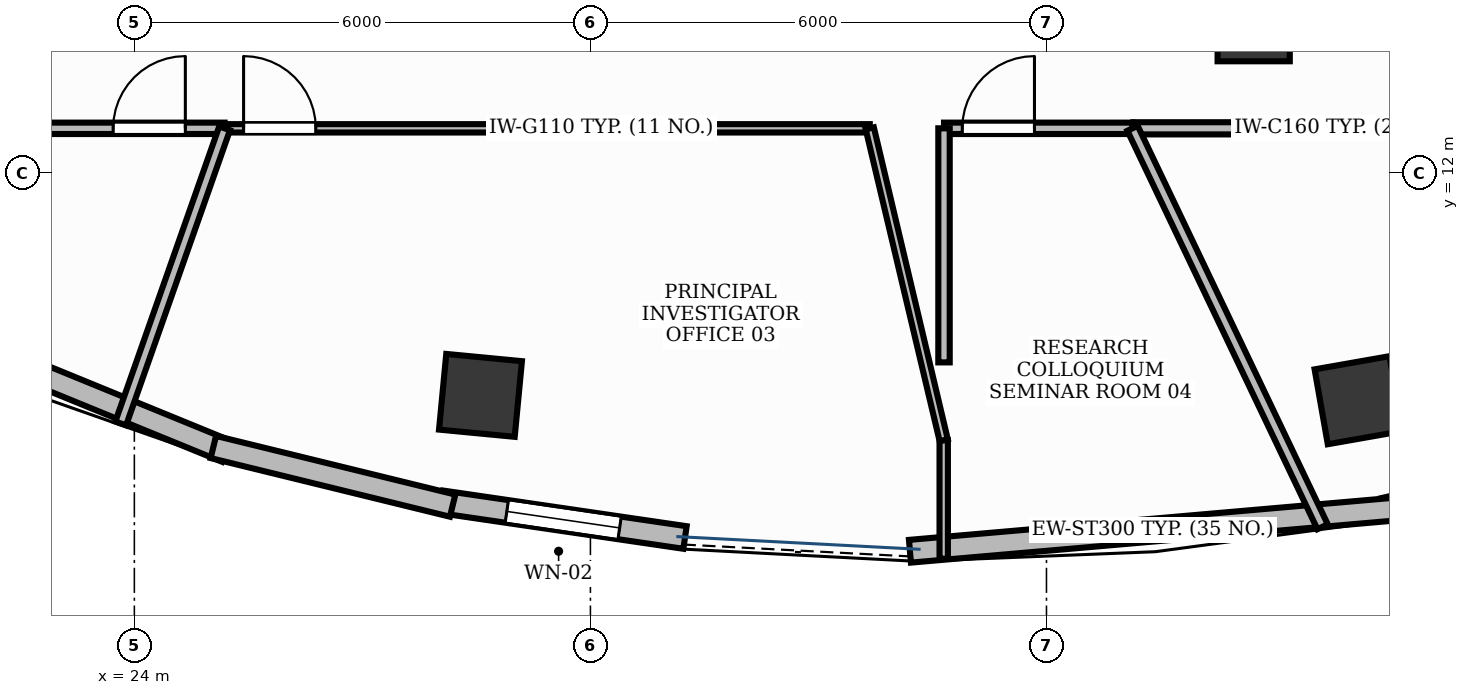
"""IFC4 building model, lengths in metres.
Left out: names, types, materials, properties, quantities, classifications, styles, units other than length and angle.
Written with IfcOpenShell. Run it as: python <this file> out.ifc"""

import sys

from ifc_helpers import new_model, si_unit, direction, frame, frame_2d, origin, origin_2d, place, context, subcontext, project, spatial, rectangle, extrude, element, fill, save


model = new_model("IFC4")
c1 = context("Model", 3, precision=1e-05, world=origin(), true_north=direction((0.0, 1.0)))
c2 = subcontext(c1, "Body", "Model", "MODEL_VIEW")
j1 = project(units=[si_unit("LENGTHUNIT", "METRE"), si_unit("PLANEANGLEUNIT", "RADIAN")], contexts=[c1])
p1 = place(None, origin())
s1 = spatial("IfcSite", under=j1, at=p1, CompositionType="ELEMENT")
p2 = place(p1, origin())
s2 = spatial("IfcBuilding", under=s1, at=p2, CompositionType="ELEMENT")
p3 = place(p2, frame((0.0, 0.0, 200.4)))
s3 = spatial("IfcBuildingStorey", under=s2, at=p3, CompositionType="ELEMENT", Elevation=200.4)
for number, where, z_axis, x_axis in (
    (1, (28.554, 9.076, -0.0), (0.0, 0.0, 1.0), (-0.995, 0.095, 0.0)),
    (2, (40.107, 9.013, -0.0), (0.0, 0.0, 1.0), (0.985, 0.173, 0.0)),
):
    element("IfcColumn", number, at=place(p3, frame(where, z_axis=z_axis, x_axis=x_axis)), inside=s3, PredefinedType="COLUMN", context=c2, shape_type="SweptSolid", body=[
        extrude(rectangle(XDim=1.0, YDim=1.0, at=origin_2d()), origin(), (0.0, 0.0, 1.0), 3.901),
    ])
p4 = place(p3, frame((38.726, 13.947, -0.0), z_axis=(0.0, 0.0, 1.0), x_axis=(1.0, 0.0, 0.0)))
e3 = element("IfcColumn", 3, at=p4, inside=s3, PredefinedType="COLUMN", context=c2, shape_type="SweptSolid", body=[
    extrude(rectangle(XDim=0.95, YDim=0.95, at=origin_2d()), origin(), (0.0, 0.0, 1.0), 3.901),
])
p5 = place(p3, frame((28.04, 7.676, 0.0), z_axis=(0.0, 0.0, 1.0), x_axis=(0.989447361059, -0.144892786892, 0.0)))
e4 = element("IfcWall", 4, at=p5, inside=s3, PredefinedType="STANDARD", context=c2, shape_type="SweptSolid", body=[
    extrude(rectangle(XDim=3.239, YDim=0.3, at=frame_2d((1.619, 0.0))), origin(), (0.0, 0.0, 1.0), 3.9),
])
p6 = place(p5, frame((0.869, 0.0, 0.95)))
e5 = element("IfcOpeningElement", 5, at=p6, cuts=e4, PredefinedType="OPENING", context=c2, shape_type="SweptSolid", body=[
    extrude(rectangle(XDim=1.5, YDim=1.8, at=frame_2d((0.75, 0.9))), frame((0.0, 0.165, 0.0), z_axis=(0.0, -1.0, 0.0), x_axis=(1.0, 0.0, 0.0)), (0.0, 0.0, 1.0), 0.33),
])
p7 = place(p3, frame((40.432, 7.577, 0.0), z_axis=(0.0, 0.0, 1.0), x_axis=(0.974139105955, 0.225949114292, 0.0)))
e6 = element("IfcWall", 6, at=p7, inside=s3, PredefinedType="STANDARD", context=c2, shape_type="SweptSolid", body=[
    extrude(rectangle(XDim=3.207, YDim=0.3, at=frame_2d((1.604, 0.0))), origin(), (0.0, 0.0, 1.0), 3.9),
])
p8 = place(p7, frame((0.854, 0.0, 0.95)))
e7 = element("IfcOpeningElement", 7, at=p8, cuts=e6, PredefinedType="OPENING", context=c2, shape_type="SweptSolid", body=[
    extrude(rectangle(XDim=1.5, YDim=1.8, at=frame_2d((0.75, 0.9))), frame((0.0, 0.165, 0.0), z_axis=(0.0, -1.0, 0.0), x_axis=(1.0, 0.0, 0.0)), (0.0, 0.0, 1.0), 0.33),
])
p9 = place(p3, frame((19.526, 10.667, 0.0), z_axis=(0.0, 0.0, 1.0), x_axis=(0.925564684887, -0.37858950605, 0.0)))
e8 = element("IfcWall", 8, at=p9, inside=s3, PredefinedType="STANDARD", context=c2, shape_type="SweptSolid", body=[
    extrude(rectangle(XDim=6.142, YDim=0.3, at=frame_2d((3.071, 0.0))), origin(), (0.0, 0.0, 1.0), 3.47),
])
p10 = place(p3, frame((25.039, 8.397, 0.0), z_axis=(0.0, 0.0, 1.0), x_axis=(0.971279195983, -0.237942689423, 0.0)))
e9 = element("IfcWall", 9, at=p10, inside=s3, PredefinedType="STANDARD", context=c2, shape_type="SweptSolid", body=[
    extrude(rectangle(XDim=3.241, YDim=0.3, at=frame_2d((1.621, 0.0))), origin(), (0.0, 0.0, 1.0), 3.9),
])
p11 = place(p3, frame((34.204, 7.026, 0.0), z_axis=(0.0, 0.0, 1.0), x_axis=(0.996244157791, 0.086588556217, 0.0)))
e10 = element("IfcWall", 10, at=p11, inside=s3, PredefinedType="STANDARD", context=c2, shape_type="SweptSolid", body=[
    extrude(rectangle(XDim=6.415, YDim=0.3, at=frame_2d((3.207, 0.0))), origin(), (0.0, 0.0, 1.0), 3.9),
])
p12 = place(p3, frame((20.801, 12.59, 0.0), z_axis=(0.0, 0.0, 1.0), x_axis=(1.0, 0.0, 0.0)))
e11 = element("IfcWall", 11, at=p12, inside=s3, PredefinedType="PARTITIONING", context=c2, shape_type="SweptSolid", body=[
    extrude(rectangle(XDim=4.386, YDim=0.15, at=frame_2d((2.193, 0.0))), origin(), (0.0, 0.0, 1.0), 2.91),
])
p13 = place(p12, frame((2.92, 0.0, 0.0)))
e12 = element("IfcOpeningElement", 12, at=p13, cuts=e11, PredefinedType="OPENING", context=c2, shape_type="SweptSolid", body=[
    extrude(rectangle(XDim=0.95, YDim=2.15, at=frame_2d((0.475, 1.075))), frame((0.0, 0.09, 0.0), z_axis=(0.0, -1.0, 0.0), x_axis=(1.0, 0.0, 0.0)), (0.0, 0.0, 1.0), 0.18),
])
p14 = place(p3, frame((25.197, 12.59, 0.0), z_axis=(0.0, 0.0, 1.0), x_axis=(1.0, 0.0, 0.0)))
e13 = element("IfcWall", 13, at=p14, inside=s3, PredefinedType="MOVABLE", context=c2, shape_type="SweptSolid", body=[
    extrude(rectangle(XDim=8.478, YDim=0.11, at=frame_2d((4.239, 0.0))), origin(), (0.0, 0.0, 1.0), 2.91),
])
p15 = place(p14, frame((0.24, 0.0, 0.0)))
e14 = element("IfcOpeningElement", 14, at=p15, cuts=e13, PredefinedType="OPENING", context=c2, shape_type="SweptSolid", body=[
    extrude(rectangle(XDim=0.95, YDim=2.15, at=frame_2d((0.475, 1.075))), frame((0.0, 0.07, 0.0), z_axis=(0.0, -1.0, 0.0), x_axis=(1.0, 0.0, 0.0)), (0.0, 0.0, 1.0), 0.14),
])
p16 = place(p3, frame((34.652, 12.59, 0.0), z_axis=(0.0, 0.0, 1.0), x_axis=(1.0, 0.0, 0.0)))
e15 = element("IfcWall", 15, at=p16, inside=s3, PredefinedType="PARTITIONING", context=c2, shape_type="SweptSolid", body=[
    extrude(rectangle(XDim=2.48, YDim=0.15, at=frame_2d((1.24, 0.0))), origin(), (0.0, 0.0, 1.0), 2.91),
])
p17 = place(p16, frame((0.24, 0.0, 0.0)))
e16 = element("IfcOpeningElement", 16, at=p17, cuts=e15, PredefinedType="OPENING", context=c2, shape_type="SweptSolid", body=[
    extrude(rectangle(XDim=0.95, YDim=2.15, at=frame_2d((0.475, 1.075))), frame((0.0, 0.09, 0.0), z_axis=(0.0, -1.0, 0.0), x_axis=(1.0, 0.0, 0.0)), (0.0, 0.0, 1.0), 0.18),
])
p18 = place(p3, frame((37.143, 12.59, 0.0), z_axis=(0.0, 0.0, 1.0), x_axis=(1.0, 0.0, 0.0)))
e17 = element("IfcWall", 17, at=p18, inside=s3, PredefinedType="PARTITIONING", context=c2, shape_type="SweptSolid", body=[
    extrude(rectangle(XDim=7.013, YDim=0.16, at=frame_2d((3.507, 0.0))), origin(), (0.0, 0.0, 1.0), 2.91),
])
p19 = place(p18, frame((5.823, 0.0, 0.0)))
e18 = element("IfcOpeningElement", 18, at=p19, cuts=e17, PredefinedType="OPENING", context=c2, shape_type="SweptSolid", body=[
    extrude(rectangle(XDim=0.95, YDim=2.15, at=frame_2d((0.475, 1.075))), frame((0.0, 0.095, 0.0), z_axis=(0.0, -1.0, 0.0), x_axis=(1.0, 0.0, 0.0)), (0.0, 0.0, 1.0), 0.19),
])
p20 = place(p3, frame((25.187, 12.59, 0.0), z_axis=(0.0, 0.0, 1.0), x_axis=(-0.33203815737, -0.9432659551, 0.0)))
e19 = element("IfcWall", 19, at=p20, inside=s3, PredefinedType="PARTITIONING", context=c2, shape_type="SweptSolid", body=[
    extrude(rectangle(XDim=4.116, YDim=0.15, at=frame_2d((2.058, 0.0))), origin(), (0.0, 0.0, 1.0), 2.91),
])
p21 = place(p3, frame((34.648, 8.487, 0.0), z_axis=(0.0, 0.0, 1.0), x_axis=(0.0, -1.0, 0.0)))
e20 = element("IfcWall", 20, at=p21, inside=s3, PredefinedType="MOVABLE", context=c2, shape_type="SweptSolid", body=[
    extrude(rectangle(XDim=1.559, YDim=0.11, at=frame_2d((0.779, 0.0))), origin(), (0.0, 0.0, 1.0), 2.91),
])
p22 = place(p3, frame((33.675, 12.59, 0.0), z_axis=(0.0, 0.0, 1.0), x_axis=(0.230652477901, -0.973036193797, 0.0)))
e21 = element("IfcWall", 21, at=p22, inside=s3, PredefinedType="MOVABLE", context=c2, shape_type="SweptSolid", body=[
    extrude(rectangle(XDim=4.217, YDim=0.11, at=frame_2d((2.108, 0.0))), origin(), (0.0, 0.0, 1.0), 2.91),
])
p23 = place(p3, frame((34.652, 9.51, 0.0), z_axis=(0.0, 0.0, 1.0), x_axis=(0.0, 1.0, 0.0)))
e22 = element("IfcWall", 22, at=p23, inside=s3, PredefinedType="PARTITIONING", context=c2, shape_type="SweptSolid", body=[
    extrude(rectangle(XDim=3.08, YDim=0.15, at=frame_2d((1.54, 0.0))), origin(), (0.0, 0.0, 1.0), 2.91),
])
p24 = place(p3, frame((37.132, 12.59, 0.0), z_axis=(0.0, 0.0, 1.0), x_axis=(0.430506245384, -0.902587598344, 0.0)))
e23 = element("IfcWall", 23, at=p24, inside=s3, PredefinedType="PARTITIONING", context=c2, shape_type="SweptSolid", body=[
    extrude(rectangle(XDim=5.808, YDim=0.15, at=frame_2d((2.904, 0.0))), origin(), (0.0, 0.0, 1.0), 2.91),
])
p25 = place(p6, origin())
e24 = element("IfcWindow", 24, at=p25, inside=s3, PartitioningType="DOUBLE_PANEL_VERTICAL", PredefinedType="WINDOW", context=c2, shape_type="SweptSolid", body=[
    extrude(rectangle(XDim=1.5, YDim=1.8, at=frame_2d((0.75, 0.9))), frame((0.0, 0.03, 0.0), z_axis=(0.0, -1.0, 0.0), x_axis=(1.0, 0.0, 0.0)), (0.0, 0.0, 1.0), 0.06),
])
fill(e5, e24)
p26 = place(p13, origin())
e25 = element("IfcDoor", 25, at=p26, inside=s3, OperationType="SINGLE_SWING_RIGHT", PredefinedType="DOOR", context=c2, shape_type="SweptSolid", body=[
    extrude(rectangle(XDim=0.95, YDim=2.15, at=frame_2d((0.475, 1.075))), frame((0.0, 0.025, 0.0), z_axis=(0.0, -1.0, 0.0), x_axis=(1.0, 0.0, 0.0)), (0.0, 0.0, 1.0), 0.05),
])
fill(e12, e25)
p27 = place(p15, origin())
e26 = element("IfcDoor", 26, at=p27, inside=s3, OperationType="SINGLE_SWING_LEFT", PredefinedType="DOOR", context=c2, shape_type="SweptSolid", body=[
    extrude(rectangle(XDim=0.95, YDim=2.15, at=frame_2d((0.475, 1.075))), frame((0.0, 0.025, 0.0), z_axis=(0.0, -1.0, 0.0), x_axis=(1.0, 0.0, 0.0)), (0.0, 0.0, 1.0), 0.05),
])
fill(e14, e26)
p28 = place(p17, origin())
e27 = element("IfcDoor", 27, at=p28, inside=s3, OperationType="SINGLE_SWING_RIGHT", PredefinedType="DOOR", context=c2, shape_type="SweptSolid", body=[
    extrude(rectangle(XDim=0.95, YDim=2.15, at=frame_2d((0.475, 1.075))), frame((0.0, 0.025, 0.0), z_axis=(0.0, -1.0, 0.0), x_axis=(1.0, 0.0, 0.0)), (0.0, 0.0, 1.0), 0.05),
])
fill(e16, e27)
save(model, sys.argv[1])
